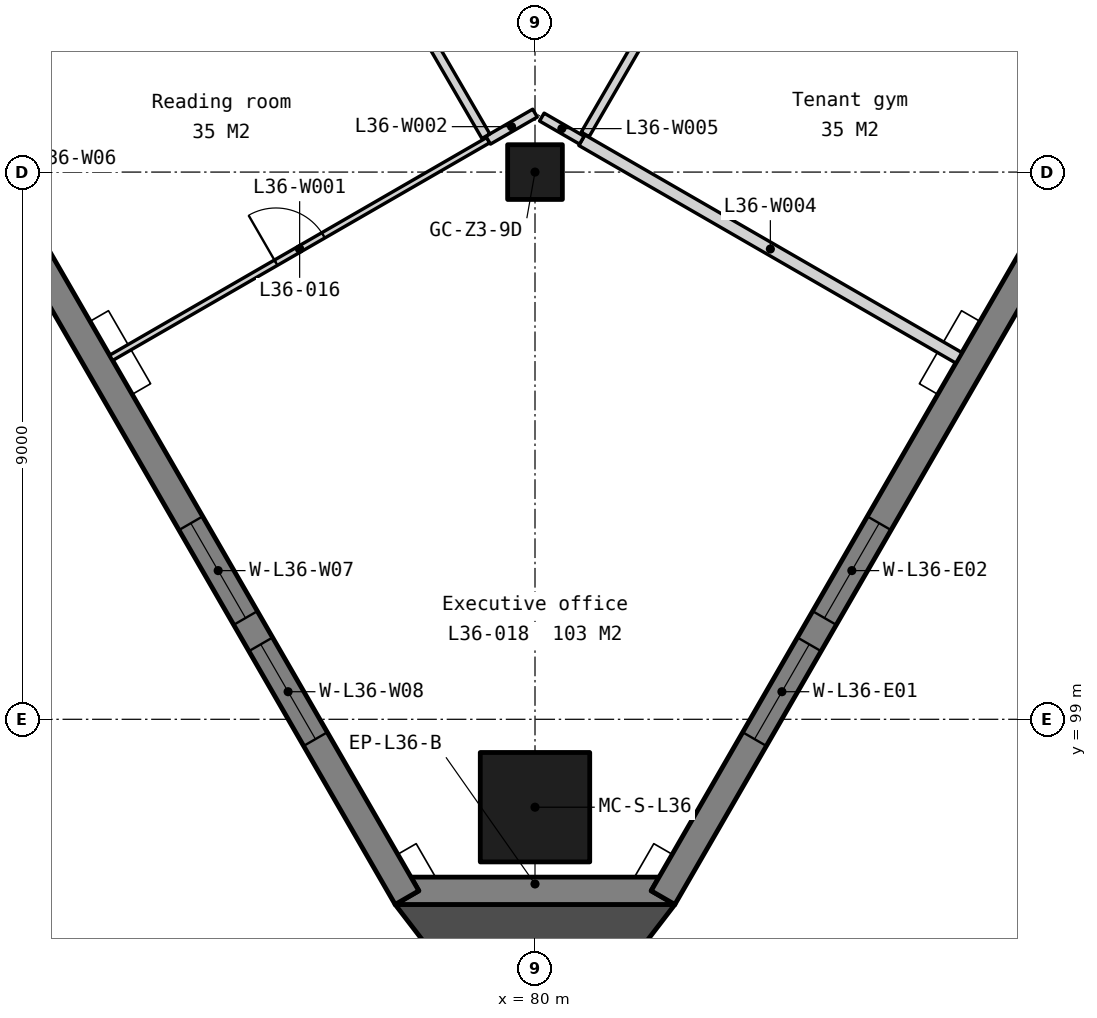
"""IFC4 building model, lengths in metres.
Left out: names, types, materials, properties, quantities, classifications, styles, units other than length and angle.
Written with IfcOpenShell. Run it as: python <this file> out.ifc"""

import sys

from ifc_helpers import new_model, si_unit, direction, frame, frame_2d, origin, origin_2d, place, context, subcontext, project, spatial, polyline, rectangle, outline, extrude, element, fill, save


model = new_model("IFC4")
c1 = context("Model", 3, precision=1e-05, world=origin(), true_north=direction((0.0, 1.0)))
c2 = subcontext(c1, "Body", "Model", "MODEL_VIEW")
j1 = project(units=[si_unit("LENGTHUNIT", "METRE"), si_unit("PLANEANGLEUNIT", "RADIAN")], contexts=[c1])
p1 = place(None, origin())
s1 = spatial("IfcSite", under=j1, at=p1, CompositionType="ELEMENT")
p2 = place(p1, origin())
s2 = spatial("IfcBuilding", under=s1, at=p2, CompositionType="ELEMENT")
p3 = place(p2, frame((0.0, 0.0, 144.2)))
s3 = spatial("IfcBuildingStorey", under=s2, at=p3, CompositionType="ELEMENT", Elevation=144.2)
p4 = place(p3, frame((80.0, 108.0, 0.0), z_axis=(0.0, 0.0, 1.0), x_axis=(1.0, 0.0, 0.0)))
e1 = element("IfcColumn", 1, at=p4, inside=s3, PredefinedType="COLUMN", context=c2, shape_type="SweptSolid", body=[
    extrude(rectangle(XDim=0.9, YDim=0.9, at=origin_2d()), origin(), (0.0, 0.0, 1.0), 3.9),
])
p5 = place(p3, frame((80.0, 97.554, 0.0), z_axis=(0.0, 0.0, 1.0), x_axis=(1.0, 0.0, 0.0)))
e2 = element("IfcColumn", 2, at=p5, inside=s3, PredefinedType="COLUMN", context=c2, shape_type="SweptSolid", body=[
    extrude(rectangle(XDim=1.8, YDim=1.8, at=origin_2d()), origin(), (0.0, 0.0, 1.0), 3.9),
])
p6 = place(p3, frame((0.0, 0.0, -0.15)))
e3 = element("IfcWall", 3, at=p6, inside=s3, PredefinedType="SOLIDWALL", context=c2, shape_type="SweptSolid", body=[
    extrude(outline(polyline([(77.7, 95.954), (78.09, 96.179), (77.96, 96.404), (82.04, 96.404), (81.91, 96.179), (82.3, 95.954), (77.7, 95.954)])), origin(), (0.0, 0.0, 1.0), 3.9),
])
p7 = place(p3, frame((57.652, 131.129, -0.15), z_axis=(0.0, 0.0, 1.0), x_axis=(0.499997369791, -0.866026922331, 0.0)))
e4 = element("IfcWall", 4, at=p7, inside=s3, PredefinedType="SOLIDWALL", context=c2, shape_type="SweptSolid", body=[
    extrude(outline(polyline([(40.486, 0.0), (40.486, 3.9), (0.0, 3.9), (0.0, 0.0), (40.486, 0.0)])), frame((0.0, 0.225, 0.0), z_axis=(0.0, -1.0, 0.0), x_axis=(1.0, 0.0, 0.0)), (0.0, 0.0, 1.0), 0.45),
])
p8 = place(p7, frame((3.011, 0.0, 0.95)))
e5 = element("IfcOpeningElement", 5, at=p8, cuts=e4, PredefinedType="OPENING", context=c2, shape_type="SweptSolid", body=[
    extrude(rectangle(XDim=1.8, YDim=2.2, at=frame_2d((0.9, 1.1))), frame((0.0, 0.235, 0.0), z_axis=(0.0, -1.0, 0.0), x_axis=(1.0, 0.0, 0.0)), (0.0, 0.0, 1.0), 0.47),
])
p9 = place(p7, frame((5.311, 0.0, 0.95)))
e6 = element("IfcOpeningElement", 6, at=p9, cuts=e4, PredefinedType="OPENING", context=c2, shape_type="SweptSolid", body=[
    extrude(rectangle(XDim=1.8, YDim=2.2, at=frame_2d((0.9, 1.1))), frame((0.0, 0.235, 0.0), z_axis=(0.0, -1.0, 0.0), x_axis=(1.0, 0.0, 0.0)), (0.0, 0.0, 1.0), 0.47),
])
p10 = place(p7, frame((13.132, 0.0, 0.95)))
e7 = element("IfcOpeningElement", 7, at=p10, cuts=e4, PredefinedType="OPENING", context=c2, shape_type="SweptSolid", body=[
    extrude(rectangle(XDim=1.8, YDim=2.2, at=frame_2d((0.9, 1.1))), frame((0.0, 0.235, 0.0), z_axis=(0.0, -1.0, 0.0), x_axis=(1.0, 0.0, 0.0)), (0.0, 0.0, 1.0), 0.47),
])
p11 = place(p7, frame((15.432, 0.0, 0.95)))
e8 = element("IfcOpeningElement", 8, at=p11, cuts=e4, PredefinedType="OPENING", context=c2, shape_type="SweptSolid", body=[
    extrude(rectangle(XDim=1.8, YDim=2.2, at=frame_2d((0.9, 1.1))), frame((0.0, 0.235, 0.0), z_axis=(0.0, -1.0, 0.0), x_axis=(1.0, 0.0, 0.0)), (0.0, 0.0, 1.0), 0.47),
])
p12 = place(p7, frame((23.254, 0.0, 0.95)))
e9 = element("IfcOpeningElement", 9, at=p12, cuts=e4, PredefinedType="OPENING", context=c2, shape_type="SweptSolid", body=[
    extrude(rectangle(XDim=1.8, YDim=2.2, at=frame_2d((0.9, 1.1))), frame((0.0, 0.235, 0.0), z_axis=(0.0, -1.0, 0.0), x_axis=(1.0, 0.0, 0.0)), (0.0, 0.0, 1.0), 0.47),
])
p13 = place(p7, frame((25.554, 0.0, 0.95)))
e10 = element("IfcOpeningElement", 10, at=p13, cuts=e4, PredefinedType="OPENING", context=c2, shape_type="SweptSolid", body=[
    extrude(rectangle(XDim=1.8, YDim=2.2, at=frame_2d((0.9, 1.1))), frame((0.0, 0.235, 0.0), z_axis=(0.0, -1.0, 0.0), x_axis=(1.0, 0.0, 0.0)), (0.0, 0.0, 1.0), 0.47),
])
p14 = place(p7, frame((33.375, 0.0, 0.95)))
e11 = element("IfcOpeningElement", 11, at=p14, cuts=e4, PredefinedType="OPENING", context=c2, shape_type="SweptSolid", body=[
    extrude(rectangle(XDim=1.8, YDim=2.2, at=frame_2d((0.9, 1.1))), frame((0.0, 0.235, 0.0), z_axis=(0.0, -1.0, 0.0), x_axis=(1.0, 0.0, 0.0)), (0.0, 0.0, 1.0), 0.47),
])
p15 = place(p7, frame((35.675, 0.0, 0.95)))
e12 = element("IfcOpeningElement", 12, at=p15, cuts=e4, PredefinedType="OPENING", context=c2, shape_type="SweptSolid", body=[
    extrude(rectangle(XDim=1.8, YDim=2.2, at=frame_2d((0.9, 1.1))), frame((0.0, 0.235, 0.0), z_axis=(0.0, -1.0, 0.0), x_axis=(1.0, 0.0, 0.0)), (0.0, 0.0, 1.0), 0.47),
])
p16 = place(p3, frame((82.105, 96.067, -0.15), z_axis=(0.0, 0.0, 1.0), x_axis=(0.499997369791, 0.866026922331, 0.0)))
e13 = element("IfcWall", 13, at=p16, inside=s3, PredefinedType="SOLIDWALL", context=c2, shape_type="SweptSolid", body=[
    extrude(outline(polyline([(40.486, 0.0), (40.486, 3.9), (0.0, 3.9), (0.0, 0.0), (40.486, 0.0)])), frame((0.0, 0.225, 0.0), z_axis=(0.0, -1.0, 0.0), x_axis=(1.0, 0.0, 0.0)), (0.0, 0.0, 1.0), 0.45),
])
p17 = place(p16, frame((3.011, 0.0, 0.95)))
e14 = element("IfcOpeningElement", 14, at=p17, cuts=e13, PredefinedType="OPENING", context=c2, shape_type="SweptSolid", body=[
    extrude(rectangle(XDim=1.8, YDim=2.2, at=frame_2d((0.9, 1.1))), frame((0.0, 0.235, 0.0), z_axis=(0.0, -1.0, 0.0), x_axis=(1.0, 0.0, 0.0)), (0.0, 0.0, 1.0), 0.47),
])
p18 = place(p16, frame((5.311, 0.0, 0.95)))
e15 = element("IfcOpeningElement", 15, at=p18, cuts=e13, PredefinedType="OPENING", context=c2, shape_type="SweptSolid", body=[
    extrude(rectangle(XDim=1.8, YDim=2.2, at=frame_2d((0.9, 1.1))), frame((0.0, 0.235, 0.0), z_axis=(0.0, -1.0, 0.0), x_axis=(1.0, 0.0, 0.0)), (0.0, 0.0, 1.0), 0.47),
])
p19 = place(p16, frame((13.132, 0.0, 0.95)))
e16 = element("IfcOpeningElement", 16, at=p19, cuts=e13, PredefinedType="OPENING", context=c2, shape_type="SweptSolid", body=[
    extrude(rectangle(XDim=1.8, YDim=2.2, at=frame_2d((0.9, 1.1))), frame((0.0, 0.235, 0.0), z_axis=(0.0, -1.0, 0.0), x_axis=(1.0, 0.0, 0.0)), (0.0, 0.0, 1.0), 0.47),
])
p20 = place(p16, frame((15.432, 0.0, 0.95)))
e17 = element("IfcOpeningElement", 17, at=p20, cuts=e13, PredefinedType="OPENING", context=c2, shape_type="SweptSolid", body=[
    extrude(rectangle(XDim=1.8, YDim=2.2, at=frame_2d((0.9, 1.1))), frame((0.0, 0.235, 0.0), z_axis=(0.0, -1.0, 0.0), x_axis=(1.0, 0.0, 0.0)), (0.0, 0.0, 1.0), 0.47),
])
p21 = place(p16, frame((23.254, 0.0, 0.95)))
e18 = element("IfcOpeningElement", 18, at=p21, cuts=e13, PredefinedType="OPENING", context=c2, shape_type="SweptSolid", body=[
    extrude(rectangle(XDim=1.8, YDim=2.2, at=frame_2d((0.9, 1.1))), frame((0.0, 0.235, 0.0), z_axis=(0.0, -1.0, 0.0), x_axis=(1.0, 0.0, 0.0)), (0.0, 0.0, 1.0), 0.47),
])
p22 = place(p16, frame((25.554, 0.0, 0.95)))
e19 = element("IfcOpeningElement", 19, at=p22, cuts=e13, PredefinedType="OPENING", context=c2, shape_type="SweptSolid", body=[
    extrude(rectangle(XDim=1.8, YDim=2.2, at=frame_2d((0.9, 1.1))), frame((0.0, 0.235, 0.0), z_axis=(0.0, -1.0, 0.0), x_axis=(1.0, 0.0, 0.0)), (0.0, 0.0, 1.0), 0.47),
])
p23 = place(p16, frame((33.375, 0.0, 0.95)))
e20 = element("IfcOpeningElement", 20, at=p23, cuts=e13, PredefinedType="OPENING", context=c2, shape_type="SweptSolid", body=[
    extrude(rectangle(XDim=1.8, YDim=2.2, at=frame_2d((0.9, 1.1))), frame((0.0, 0.235, 0.0), z_axis=(0.0, -1.0, 0.0), x_axis=(1.0, 0.0, 0.0)), (0.0, 0.0, 1.0), 0.47),
])
p24 = place(p16, frame((35.675, 0.0, 0.95)))
e21 = element("IfcOpeningElement", 21, at=p24, cuts=e13, PredefinedType="OPENING", context=c2, shape_type="SweptSolid", body=[
    extrude(rectangle(XDim=1.8, YDim=2.2, at=frame_2d((0.9, 1.1))), frame((0.0, 0.235, 0.0), z_axis=(0.0, -1.0, 0.0), x_axis=(1.0, 0.0, 0.0)), (0.0, 0.0, 1.0), 0.47),
])
p25 = place(p3, frame((0.0, 0.0, -0.15)))
e22 = element("IfcWall", 22, at=p25, inside=s3, PredefinedType="SOLIDWALL", context=c2, shape_type="SweptSolid", body=[
    extrude(outline(polyline([(77.7, 95.954), (80.0, 92.96), (82.3, 95.954), (77.7, 95.954)])), origin(), (0.0, 0.0, 1.0), 3.9),
])
p26 = place(p3, frame((73.029, 104.945, 0.0), z_axis=(0.0, 0.0, 1.0), x_axis=(0.866033408367, 0.4999861354, 0.0)))
e23 = element("IfcWall", 23, at=p26, inside=s3, PredefinedType="PARTITIONING", context=c2, shape_type="SweptSolid", body=[
    extrude(rectangle(XDim=7.16, YDim=0.1, at=frame_2d((3.58, 0.0))), origin(), (0.0, 0.0, 1.0), 3.75),
])
p27 = place(p26, frame((3.13, 0.0, 0.0)))
e24 = element("IfcOpeningElement", 24, at=p27, cuts=e23, PredefinedType="OPENING", context=c2, shape_type="SweptSolid", body=[
    extrude(rectangle(XDim=0.9, YDim=2.1, at=frame_2d((0.45, 1.05))), frame((0.0, 0.06, 0.0), z_axis=(0.0, -1.0, 0.0), x_axis=(1.0, 0.0, 0.0)), (0.0, 0.0, 1.0), 0.12),
])
p28 = place(p3, frame((79.23, 108.525, 0.0), z_axis=(0.0, 0.0, 1.0), x_axis=(0.865970738743, 0.500094670678, 0.0)))
e25 = element("IfcWall", 25, at=p28, inside=s3, PredefinedType="PARTITIONING", context=c2, shape_type="SweptSolid", body=[
    extrude(rectangle(XDim=0.889, YDim=0.15, at=frame_2d((0.445, 0.0))), origin(), (0.0, 0.0, 1.0), 3.75),
])
p29 = place(p3, frame((76.691, 112.903, 0.0), z_axis=(0.0, 0.0, 1.0), x_axis=(0.501707830428, -0.8650371396, 0.0)))
e26 = element("IfcWall", 26, at=p29, inside=s3, PredefinedType="PARTITIONING", context=c2, shape_type="SweptSolid", body=[
    extrude(rectangle(XDim=4.986, YDim=0.15, at=frame_2d((2.493, 0.0))), origin(), (0.0, 0.0, 1.0), 3.75),
])
p30 = place(p29, frame((1.993, 0.0, 0.0)))
e27 = element("IfcOpeningElement", 27, at=p30, cuts=e26, PredefinedType="OPENING", context=c2, shape_type="SweptSolid", body=[
    extrude(rectangle(XDim=1.0, YDim=2.1, at=frame_2d((0.5, 1.05))), frame((0.0, 0.085, 0.0), z_axis=(0.0, -1.0, 0.0), x_axis=(1.0, 0.0, 0.0)), (0.0, 0.0, 1.0), 0.17),
])
p31 = place(p3, frame((80.77, 108.525, 0.0), z_axis=(0.0, 0.0, 1.0), x_axis=(0.866033408367, -0.4999861354, 0.0)))
e28 = element("IfcWall", 28, at=p31, inside=s3, PredefinedType="PARTITIONING", context=c2, shape_type="SweptSolid", body=[
    extrude(rectangle(XDim=7.16, YDim=0.2, at=frame_2d((3.58, 0.0))), origin(), (0.0, 0.0, 1.0), 3.75),
])
p32 = place(p3, frame((80.113, 108.905, 0.0), z_axis=(0.0, 0.0, 1.0), x_axis=(0.865939322839, -0.50014906694, 0.0)))
e29 = element("IfcWall", 29, at=p32, inside=s3, PredefinedType="PARTITIONING", context=c2, shape_type="SweptSolid", body=[
    extrude(rectangle(XDim=0.76, YDim=0.15, at=frame_2d((0.38, 0.0))), origin(), (0.0, 0.0, 1.0), 3.75),
])
p33 = place(p3, frame((70.499, 109.327, 0.0), z_axis=(0.0, 0.0, 1.0), x_axis=(0.866010067511, 0.500026562264, 0.0)))
e30 = element("IfcWall", 30, at=p33, inside=s3, PredefinedType="PARTITIONING", context=c2, shape_type="SweptSolid", body=[
    extrude(rectangle(XDim=7.065, YDim=0.2, at=frame_2d((3.532, 0.0))), origin(), (0.0, 0.0, 1.0), 3.75),
])
p34 = place(p3, frame((83.374, 112.865, 0.0), z_axis=(0.0, 0.0, 1.0), x_axis=(0.866021813296, -0.500006218857, 0.0)))
e31 = element("IfcWall", 31, at=p34, inside=s3, PredefinedType="PARTITIONING", context=c2, shape_type="SweptSolid", body=[
    extrude(rectangle(XDim=7.075, YDim=0.1, at=frame_2d((3.538, 0.0))), origin(), (0.0, 0.0, 1.0), 3.75),
])
p35 = place(p34, frame((3.087, 0.0, 0.0)))
e32 = element("IfcOpeningElement", 32, at=p35, cuts=e31, PredefinedType="OPENING", context=c2, shape_type="SweptSolid", body=[
    extrude(rectangle(XDim=0.9, YDim=2.1, at=frame_2d((0.45, 1.05))), frame((0.0, 0.06, 0.0), z_axis=(0.0, -1.0, 0.0), x_axis=(1.0, 0.0, 0.0)), (0.0, 0.0, 1.0), 0.12),
])
p36 = place(p3, frame((80.825, 108.62, 0.0), z_axis=(0.0, 0.0, 1.0), x_axis=(0.501704805906, 0.865038893768, 0.0)))
e33 = element("IfcWall", 33, at=p36, inside=s3, PredefinedType="PARTITIONING", context=c2, shape_type="SweptSolid", body=[
    extrude(rectangle(XDim=4.951, YDim=0.15, at=frame_2d((2.476, 0.0))), origin(), (0.0, 0.0, 1.0), 3.75),
])
p37 = place(p36, frame((1.975, 0.0, 0.0)))
e34 = element("IfcOpeningElement", 34, at=p37, cuts=e33, PredefinedType="OPENING", context=c2, shape_type="SweptSolid", body=[
    extrude(rectangle(XDim=1.0, YDim=2.1, at=frame_2d((0.5, 1.05))), frame((0.0, 0.085, 0.0), z_axis=(0.0, -1.0, 0.0), x_axis=(1.0, 0.0, 0.0)), (0.0, 0.0, 1.0), 0.17),
])
p38 = place(p14, origin())
e35 = element("IfcWindow", 35, at=p38, inside=s3, PartitioningType="SINGLE_PANEL", PredefinedType="WINDOW", context=c2, shape_type="SweptSolid", body=[
    extrude(rectangle(XDim=1.8, YDim=2.2, at=frame_2d((0.9, 1.1))), frame((0.0, 0.03, 0.0), z_axis=(0.0, -1.0, 0.0), x_axis=(1.0, 0.0, 0.0)), (0.0, 0.0, 1.0), 0.06),
])
fill(e11, e35)
p39 = place(p15, origin())
e36 = element("IfcWindow", 36, at=p39, inside=s3, PartitioningType="SINGLE_PANEL", PredefinedType="WINDOW", context=c2, shape_type="SweptSolid", body=[
    extrude(rectangle(XDim=1.8, YDim=2.2, at=frame_2d((0.9, 1.1))), frame((0.0, 0.03, 0.0), z_axis=(0.0, -1.0, 0.0), x_axis=(1.0, 0.0, 0.0)), (0.0, 0.0, 1.0), 0.06),
])
fill(e12, e36)
p40 = place(p17, origin())
e37 = element("IfcWindow", 37, at=p40, inside=s3, PartitioningType="SINGLE_PANEL", PredefinedType="WINDOW", context=c2, shape_type="SweptSolid", body=[
    extrude(rectangle(XDim=1.8, YDim=2.2, at=frame_2d((0.9, 1.1))), frame((0.0, 0.03, 0.0), z_axis=(0.0, -1.0, 0.0), x_axis=(1.0, 0.0, 0.0)), (0.0, 0.0, 1.0), 0.06),
])
fill(e14, e37)
p41 = place(p18, origin())
e38 = element("IfcWindow", 38, at=p41, inside=s3, PartitioningType="SINGLE_PANEL", PredefinedType="WINDOW", context=c2, shape_type="SweptSolid", body=[
    extrude(rectangle(XDim=1.8, YDim=2.2, at=frame_2d((0.9, 1.1))), frame((0.0, 0.03, 0.0), z_axis=(0.0, -1.0, 0.0), x_axis=(1.0, 0.0, 0.0)), (0.0, 0.0, 1.0), 0.06),
])
fill(e15, e38)
p42 = place(p27, origin())
e39 = element("IfcDoor", 39, at=p42, inside=s3, OperationType="SINGLE_SWING_LEFT", PredefinedType="DOOR", context=c2, shape_type="SweptSolid", body=[
    extrude(rectangle(XDim=0.9, YDim=2.1, at=frame_2d((0.45, 1.05))), frame((0.0, 0.025, 0.0), z_axis=(0.0, -1.0, 0.0), x_axis=(1.0, 0.0, 0.0)), (0.0, 0.0, 1.0), 0.05),
])
fill(e24, e39)
save(model, sys.argv[1])
